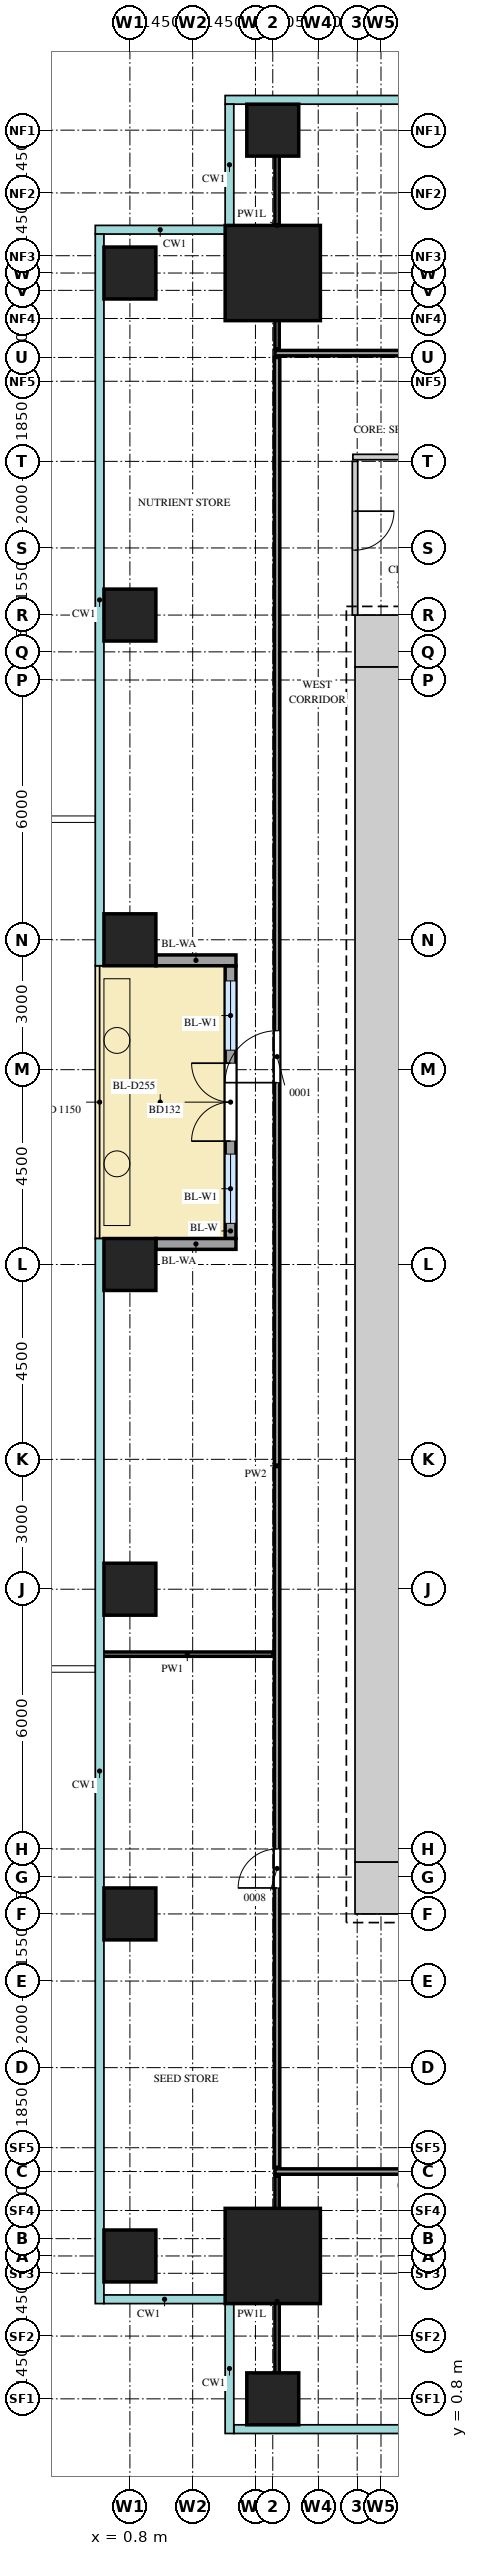
"""IFC4 building model, lengths in metres.
Left out: names, types, materials, properties, quantities, classifications, styles, units other than length and angle.
Written with IfcOpenShell. Run it as: python <this file> out.ifc"""

import sys

from ifc_helpers import new_model, si_unit, direction, frame, frame_2d, origin, origin_2d, place, context, subcontext, project, spatial, rectangle, extrude, source, transform, mapped, element, fill, save


model = new_model("IFC4")
c1 = context("Model", 3, precision=1e-05, world=origin(), true_north=direction((0.0, 1.0)))
c2 = subcontext(c1, "Body", "Model", "MODEL_VIEW")
j1 = project(units=[si_unit("LENGTHUNIT", "METRE"), si_unit("PLANEANGLEUNIT", "RADIAN")], contexts=[c1])
p1 = place(None, origin())
s1 = spatial("IfcSite", under=j1, at=p1, CompositionType="ELEMENT")
p2 = place(p1, origin())
s2 = spatial("IfcBuilding", under=s1, at=p2, CompositionType="ELEMENT")
p3 = place(p2, frame((0.0, 0.0, 64.5)))
s3 = spatial("IfcBuildingStorey", under=s2, at=p3, CompositionType="ELEMENT", Elevation=64.5)
m1 = source(origin(), c2, "Body", "SweptSolid", [
    extrude(rectangle(XDim=1.2, YDim=1.2, at=frame_2d((0.6, 0.0))), origin(), (0.0, 0.0, 1.0), 4.2),
])
for number, where, z_axis, x_axis in (
    (1, (6.0, 41.4, 0.0), (0.0, 0.0, 1.0), (1.0, 0.0, 0.0)),
    (2, (6.0, 12.6, 0.0), (0.0, 0.0, 1.0), (1.0, 0.0, 0.0)),
):
    element("IfcWall", number, at=place(p3, frame(where, z_axis=z_axis, x_axis=x_axis)), inside=s3, PredefinedType="SHEAR", context=c2, shape_type="MappedRepresentation", body=[
        mapped(m1, transform((0.0, 0.0, 0.0))),
    ])
m2 = source(origin(), c2, "Body", "SweptSolid", [
    extrude(rectangle(XDim=27.6, YDim=1.2, at=frame_2d((13.8, 0.0))), origin(), (0.0, 0.0, 1.0), 4.2),
])
p4 = place(p3, frame((6.6, 13.2, 0.0), z_axis=(0.0, 0.0, 1.0), x_axis=(0.0, 1.0, 0.0)))
e3 = element("IfcWall", 3, at=p4, inside=s3, PredefinedType="SHEAR", context=c2, shape_type="MappedRepresentation", body=[
    mapped(m2, transform((0.0, 0.0, 0.0))),
])
m3 = source(origin(), c2, "Body", "SweptSolid", [
    extrude(rectangle(XDim=2.2, YDim=2.2, at=origin_2d()), origin(), (0.0, 0.0, 1.0), 4.5),
])
for number, where, z_axis, x_axis in (
    (4, (4.1, 49.9, 0.0), (0.0, 0.0, 1.0), (1.0, 0.0, 0.0)),
    (5, (4.1, 4.1, 0.0), (0.0, 0.0, 1.0), (1.0, 0.0, 0.0)),
):
    element("IfcColumn", number, at=place(p3, frame(where, z_axis=z_axis, x_axis=x_axis)), inside=s3, PredefinedType="COLUMN", context=c2, shape_type="MappedRepresentation", body=[
        mapped(m3, transform((0.0, 0.0, 0.0))),
    ])
m4 = source(origin(), c2, "Body", "SweptSolid", [
    extrude(rectangle(XDim=1.2, YDim=1.2, at=origin_2d()), origin(), (0.0, 0.0, 1.0), 4.2),
])
for number, where, z_axis, x_axis in (
    (6, (4.1, 0.8, 0.0), (0.0, 0.0, 1.0), (1.0, 0.0, 0.0)),
    (7, (4.1, 53.2, 0.0), (0.0, 0.0, 1.0), (1.0, 0.0, 0.0)),
    (8, (0.8, 4.1, 0.0), (0.0, 0.0, 1.0), (1.0, 0.0, 0.0)),
    (9, (0.8, 12.0, 0.0), (0.0, 0.0, 1.0), (1.0, 0.0, 0.0)),
    (10, (0.8, 19.5, 0.0), (0.0, 0.0, 1.0), (1.0, 0.0, 0.0)),
    (11, (0.8, 27.0, 0.0), (0.0, 0.0, 1.0), (1.0, 0.0, 0.0)),
    (12, (0.8, 34.5, 0.0), (0.0, 0.0, 1.0), (1.0, 0.0, 0.0)),
    (13, (0.8, 42.0, 0.0), (0.0, 0.0, 1.0), (1.0, 0.0, 0.0)),
    (14, (0.8, 49.9, 0.0), (0.0, 0.0, 1.0), (1.0, 0.0, 0.0)),
):
    element("IfcColumn", number, at=place(p3, frame(where, z_axis=z_axis, x_axis=x_axis)), inside=s3, PredefinedType="COLUMN", context=c2, shape_type="MappedRepresentation", body=[
        mapped(m4, transform((0.0, 0.0, 0.0))),
    ])
m5 = source(origin(), c2, "Body", "SweptSolid", [
    extrude(rectangle(XDim=6.3, YDim=0.25, at=frame_2d((3.15, 0.0))), origin(), (0.0, 0.0, 1.0), 4.2),
])
p5 = place(p3, frame((3.125, 27.6, 0.0), z_axis=(0.0, 0.0, 1.0), x_axis=(0.0, 1.0, 0.0)))
e15 = element("IfcWall", 15, at=p5, inside=s3, PredefinedType="SOLIDWALL", context=c2, shape_type="MappedRepresentation", body=[
    mapped(m5, transform((0.0, 0.0, 0.0))),
])
m6 = source(origin(), c2, "Body", "SweptSolid", [
    extrude(rectangle(XDim=1.6, YDim=2.4, at=frame_2d((0.8, 1.2))), frame((0.0, 0.135, 0.0), z_axis=(0.0, -1.0, 0.0), x_axis=(1.0, 0.0, 0.0)), (0.0, 0.0, 1.0), 0.27),
])
p6 = place(p5, frame((0.35, 0.0, 0.0)))
e16 = element("IfcOpeningElement", 16, at=p6, cuts=e15, PredefinedType="OPENING", context=c2, shape_type="MappedRepresentation", body=[
    mapped(m6, transform((0.0, 0.0, 0.0))),
])
p7 = place(p5, frame((4.35, 0.0, 0.0)))
e17 = element("IfcOpeningElement", 17, at=p7, cuts=e15, PredefinedType="OPENING", context=c2, shape_type="MappedRepresentation", body=[
    mapped(m6, transform((0.0, 0.0, 0.0))),
])
m7 = source(origin(), c2, "Body", "SweptSolid", [
    extrude(rectangle(XDim=1.8, YDim=2.4, at=frame_2d((0.9, 1.2))), frame((0.0, 0.135, 0.0), z_axis=(0.0, -1.0, 0.0), x_axis=(1.0, 0.0, 0.0)), (0.0, 0.0, 1.0), 0.27),
])
p8 = place(p5, frame((2.25, 0.0, 0.0)))
e18 = element("IfcOpeningElement", 18, at=p8, cuts=e15, PredefinedType="OPENING", context=c2, shape_type="MappedRepresentation", body=[
    mapped(m7, transform((0.0, 0.0, 0.0))),
])
m8 = source(origin(), c2, "Body", "SweptSolid", [
    extrude(rectangle(XDim=1.85, YDim=0.25, at=frame_2d((0.925, 0.0))), origin(), (0.0, 0.0, 1.0), 3.9),
])
for number, where, z_axis, x_axis in (
    (19, (1.4, 27.475, 0.0), (0.0, 0.0, 1.0), (1.0, 0.0, 0.0)),
    (20, (1.4, 34.025, 0.0), (0.0, 0.0, 1.0), (1.0, 0.0, 0.0)),
):
    element("IfcWall", number, at=place(p3, frame(where, z_axis=z_axis, x_axis=x_axis)), inside=s3, PredefinedType="SOLIDWALL", context=c2, shape_type="MappedRepresentation", body=[
        mapped(m8, transform((0.0, 0.0, 0.0))),
    ])
m9 = source(origin(), c2, "Body", "SweptSolid", [
    extrude(rectangle(XDim=5.8, YDim=0.1, at=frame_2d((2.9, 0.0))), origin(), (0.0, 0.0, 1.0), 3.6),
])
p9 = place(p3, frame((4.2, 0.15, 0.0), z_axis=(0.0, 0.0, 1.0), x_axis=(0.0, 1.0, 0.0)))
e21 = element("IfcWall", 21, at=p9, inside=s3, PredefinedType="PARTITIONING", context=c2, shape_type="MappedRepresentation", body=[
    mapped(m9, transform((0.0, 0.0, 0.0))),
])
m10 = source(origin(), c2, "Body", "SweptSolid", [
    extrude(rectangle(XDim=22.3, YDim=0.125, at=frame_2d((11.15, 0.0))), origin(), (0.0, 0.0, 1.0), 4.3),
])
p10 = place(p3, frame((4.15, 6.05, 0.0), z_axis=(0.0, 0.0, 1.0), x_axis=(1.0, 0.0, 0.0)))
e22 = element("IfcWall", 22, at=p10, inside=s3, PredefinedType="PARTITIONING", context=c2, shape_type="MappedRepresentation", body=[
    mapped(m10, transform((0.0, 0.0, 0.0))),
])
m11 = source(origin(), c2, "Body", "SweptSolid", [
    extrude(rectangle(XDim=0.9, YDim=2.1, at=frame_2d((0.45, 1.05))), frame((0.0, 0.073, 0.0), z_axis=(0.0, -1.0, 0.0), x_axis=(1.0, 0.0, 0.0)), (0.0, 0.0, 1.0), 0.145),
])
p11 = place(p10, frame((3.5, 0.0, 0.0)))
e23 = element("IfcOpeningElement", 23, at=p11, cuts=e22, PredefinedType="OPENING", context=c2, shape_type="MappedRepresentation", body=[
    mapped(m11, transform((0.0, 0.0, 0.0))),
])
m12 = source(origin(), c2, "Body", "SweptSolid", [
    extrude(rectangle(XDim=1.2, YDim=2.1, at=frame_2d((0.6, 1.05))), frame((0.0, 0.073, 0.0), z_axis=(0.0, -1.0, 0.0), x_axis=(1.0, 0.0, 0.0)), (0.0, 0.0, 1.0), 0.145),
])
p12 = place(p10, frame((13.25, 0.0, 0.0)))
e24 = element("IfcOpeningElement", 24, at=p12, cuts=e22, PredefinedType="OPENING", context=c2, shape_type="MappedRepresentation", body=[
    mapped(m12, transform((0.0, 0.0, 0.0))),
])
m13 = source(origin(), c2, "Body", "SweptSolid", [
    extrude(rectangle(XDim=41.8, YDim=0.125, at=frame_2d((20.9, 0.0))), origin(), (0.0, 0.0, 1.0), 4.3),
])
p13 = place(p3, frame((4.2, 6.15, 0.0), z_axis=(0.0, 0.0, 1.0), x_axis=(0.0, 1.0, 0.0)))
e25 = element("IfcWall", 25, at=p13, inside=s3, PredefinedType="PARTITIONING", context=c2, shape_type="MappedRepresentation", body=[
    mapped(m13, transform((0.0, 0.0, 0.0))),
])
p14 = place(p13, frame((6.45, 0.0, 0.0)))
e26 = element("IfcOpeningElement", 26, at=p14, cuts=e25, PredefinedType="OPENING", context=c2, shape_type="MappedRepresentation", body=[
    mapped(m11, transform((0.0, 0.0, 0.0))),
])
p15 = place(p13, frame((25.05, 0.0, 0.0)))
e27 = element("IfcOpeningElement", 27, at=p15, cuts=e25, PredefinedType="OPENING", context=c2, shape_type="MappedRepresentation", body=[
    mapped(m12, transform((0.0, 0.0, 0.0))),
])
m14 = source(origin(), c2, "Body", "SweptSolid", [
    extrude(rectangle(XDim=3.95, YDim=0.1, at=frame_2d((1.975, 0.0))), origin(), (0.0, 0.0, 1.0), 4.3),
])
p16 = place(p3, frame((0.15, 18.0, 0.0), z_axis=(0.0, 0.0, 1.0), x_axis=(1.0, 0.0, 0.0)))
e28 = element("IfcWall", 28, at=p16, inside=s3, PredefinedType="PARTITIONING", context=c2, shape_type="MappedRepresentation", body=[
    mapped(m14, transform((0.0, 0.0, 0.0))),
])
m15 = source(origin(), c2, "Body", "SweptSolid", [
    extrude(rectangle(XDim=3.55, YDim=0.125, at=frame_2d((1.775, 0.0))), origin(), (0.0, 0.0, 1.0), 4.3),
])
p17 = place(p3, frame((6.0, 42.0, 0.0), z_axis=(0.0, 0.0, 1.0), x_axis=(0.0, 1.0, 0.0)))
e29 = element("IfcWall", 29, at=p17, inside=s3, PredefinedType="PARTITIONING", context=c2, shape_type="MappedRepresentation", body=[
    mapped(m15, transform((0.0, 0.0, 0.0))),
])
p18 = place(p17, frame((1.5, 0.0, 0.0)))
e30 = element("IfcOpeningElement", 30, at=p18, cuts=e29, PredefinedType="OPENING", context=c2, shape_type="MappedRepresentation", body=[
    mapped(m11, transform((0.0, 0.0, 0.0))),
])
m16 = source(origin(), c2, "Body", "SweptSolid", [
    extrude(rectangle(XDim=7.95, YDim=0.125, at=frame_2d((3.975, 0.0))), origin(), (0.0, 0.0, 1.0), 4.3),
])
p19 = place(p3, frame((5.95, 45.65, 0.0), z_axis=(0.0, 0.0, 1.0), x_axis=(1.0, 0.0, 0.0)))
e31 = element("IfcWall", 31, at=p19, inside=s3, PredefinedType="PARTITIONING", context=c2, shape_type="MappedRepresentation", body=[
    mapped(m16, transform((0.0, 0.0, 0.0))),
])
p20 = place(p19, frame((3.3, 0.0, 0.0)))
e32 = element("IfcOpeningElement", 32, at=p20, cuts=e31, PredefinedType="OPENING", context=c2, shape_type="MappedRepresentation", body=[
    mapped(m11, transform((0.0, 0.0, 0.0))),
])
p21 = place(p19, frame((6.1, 0.0, 0.0)))
e33 = element("IfcOpeningElement", 33, at=p21, cuts=e31, PredefinedType="OPENING", context=c2, shape_type="MappedRepresentation", body=[
    mapped(m11, transform((0.0, 0.0, 0.0))),
])
m17 = source(origin(), c2, "Body", "SweptSolid", [
    extrude(rectangle(XDim=26.6, YDim=0.125, at=frame_2d((13.3, 0.0))), origin(), (0.0, 0.0, 1.0), 4.3),
])
p22 = place(p3, frame((4.15, 48.05, 0.0), z_axis=(0.0, 0.0, 1.0), x_axis=(1.0, 0.0, 0.0)))
e34 = element("IfcWall", 34, at=p22, inside=s3, PredefinedType="PARTITIONING", context=c2, shape_type="MappedRepresentation", body=[
    mapped(m17, transform((0.0, 0.0, 0.0))),
])
p23 = place(p22, frame((7.25, 0.0, 0.0)))
e35 = element("IfcOpeningElement", 35, at=p23, cuts=e34, PredefinedType="OPENING", context=c2, shape_type="MappedRepresentation", body=[
    mapped(m11, transform((0.0, 0.0, 0.0))),
])
p24 = place(p22, frame((20.5, 0.0, 0.0)))
e36 = element("IfcOpeningElement", 36, at=p24, cuts=e34, PredefinedType="OPENING", context=c2, shape_type="MappedRepresentation", body=[
    mapped(m11, transform((0.0, 0.0, 0.0))),
])
m18 = source(origin(), c2, "Body", "SweptSolid", [
    extrude(rectangle(XDim=5.7, YDim=0.1, at=frame_2d((2.85, 0.0))), origin(), (0.0, 0.0, 1.0), 3.6),
])
p25 = place(p3, frame((4.2, 48.15, 0.0), z_axis=(0.0, 0.0, 1.0), x_axis=(0.0, 1.0, 0.0)))
e37 = element("IfcWall", 37, at=p25, inside=s3, PredefinedType="PARTITIONING", context=c2, shape_type="MappedRepresentation", body=[
    mapped(m18, transform((0.0, 0.0, 0.0))),
])
m19 = source(origin(), c2, "Body", "SweptSolid", [
    extrude(rectangle(XDim=1.6, YDim=2.4, at=frame_2d((0.8, 1.2))), frame((0.0, 0.03, 0.0), z_axis=(0.0, -1.0, 0.0), x_axis=(1.0, 0.0, 0.0)), (0.0, 0.0, 1.0), 0.06),
])
p26 = place(p6, origin())
e38 = element("IfcWindow", 38, at=p26, inside=s3, PartitioningType="SINGLE_PANEL", PredefinedType="WINDOW", context=c2, shape_type="MappedRepresentation", body=[
    mapped(m19, transform((0.0, 0.0, 0.0))),
])
fill(e16, e38)
p27 = place(p7, origin())
e39 = element("IfcWindow", 39, at=p27, inside=s3, PartitioningType="SINGLE_PANEL", PredefinedType="WINDOW", context=c2, shape_type="MappedRepresentation", body=[
    mapped(m19, transform((0.0, 0.0, 0.0))),
])
fill(e17, e39)
m20 = source(origin(), c2, "Body", "SweptSolid", [
    extrude(rectangle(XDim=1.8, YDim=2.4, at=frame_2d((0.9, 1.2))), frame((0.0, 0.025, 0.0), z_axis=(0.0, -1.0, 0.0), x_axis=(1.0, 0.0, 0.0)), (0.0, 0.0, 1.0), 0.05),
])
p28 = place(p8, origin())
e40 = element("IfcDoor", 40, at=p28, inside=s3, OperationType="DOUBLE_DOOR_DOUBLE_SWING", PredefinedType="DOOR", context=c2, shape_type="MappedRepresentation", body=[
    mapped(m20, transform((0.0, 0.0, 0.0))),
])
fill(e18, e40)
m21 = source(origin(), c2, "Body", "SweptSolid", [
    extrude(rectangle(XDim=0.9, YDim=2.1, at=frame_2d((0.45, 1.05))), frame((0.0, 0.025, 0.0), z_axis=(0.0, -1.0, 0.0), x_axis=(1.0, 0.0, 0.0)), (0.0, 0.0, 1.0), 0.05),
])
p29 = place(p18, origin())
e41 = element("IfcDoor", 41, at=p29, inside=s3, OperationType="SINGLE_SWING_RIGHT", PredefinedType="DOOR", context=c2, shape_type="MappedRepresentation", body=[
    mapped(m21, transform((0.0, 0.0, 0.0))),
])
fill(e30, e41)
p30 = place(p14, origin())
e42 = element("IfcDoor", 42, at=p30, inside=s3, OperationType="SINGLE_SWING_RIGHT", PredefinedType="DOOR", context=c2, shape_type="MappedRepresentation", body=[
    mapped(m21, transform((0.0, 0.0, 0.0))),
])
fill(e26, e42)
m22 = source(origin(), c2, "Body", "SweptSolid", [
    extrude(rectangle(XDim=1.2, YDim=2.1, at=frame_2d((0.6, 1.05))), frame((0.0, 0.025, 0.0), z_axis=(0.0, -1.0, 0.0), x_axis=(1.0, 0.0, 0.0)), (0.0, 0.0, 1.0), 0.05),
])
p31 = place(p15, origin())
e43 = element("IfcDoor", 43, at=p31, inside=s3, OperationType="SINGLE_SWING_RIGHT", PredefinedType="DOOR", context=c2, shape_type="MappedRepresentation", body=[
    mapped(m22, transform((0.0, 0.0, 0.0))),
])
fill(e27, e43)
save(model, sys.argv[1])
